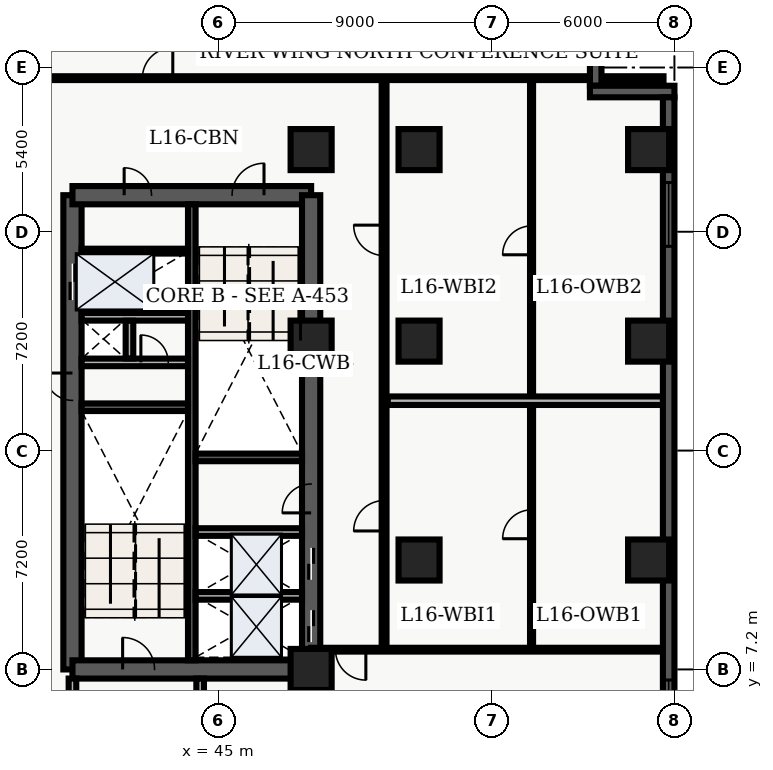
"""IFC4 building model, lengths in metres.
Left out: names, types, materials, properties, quantities, classifications, styles, units other than length and angle.
Written with IfcOpenShell. Run it as: python <this file> out.ifc"""

import sys

from ifc_helpers import new_model, entity, si_unit, converted_unit, direction, frame, origin_with_axes, origin_2d_with_axis, place, context, subcontext, project, spatial, polyline, rectangle, outline, extrude, element, fill, save


model = new_model("IFC4")
c1 = context("Model", 3, precision=1e-05, world=origin_with_axes(), true_north=direction((0.0, 1.0)))
c2 = subcontext(c1, "Body", "Model", "MODEL_VIEW")
j1 = project(units=[si_unit("LENGTHUNIT", "METRE"), converted_unit("PLANEANGLEUNIT", "DEGREE", entity("IfcPlaneAngleMeasure", 0.017), si_unit("PLANEANGLEUNIT", "RADIAN"), dimensions=[0, 0, 0, 0, 0, 0, 0])], contexts=[c1])
p1 = place(None, origin_with_axes())
s1 = spatial("IfcSite", under=j1, at=p1, CompositionType="ELEMENT")
p2 = place(p1, origin_with_axes())
s2 = spatial("IfcBuilding", under=s1, at=p2, CompositionType="ELEMENT")
p3 = place(p2, frame((0.0, 0.0, 67.8), z_axis=(0.0, 0.0, 1.0), x_axis=(1.0, 0.0, 0.0)))
s3 = spatial("IfcBuildingStorey", under=s2, at=p3, CompositionType="ELEMENT", Elevation=67.8)
p4 = place(p3, frame((40.2, 7.2, 0.0), z_axis=(0.0, 0.0, 1.0), x_axis=(0.0, 1.0, 0.0)))
e1 = element("IfcWall", 1, at=p4, inside=s3, PredefinedType="SHEAR", context=c2, shape_type="SweptSolid", body=[
    extrude(outline(polyline([(0.0, -0.3), (15.6, -0.3), (15.6, 0.3), (0.0, 0.3), (0.0, -0.3)])), origin_with_axes(), (0.0, 0.0, 1.0), 3.66),
])
p5 = place(p4, frame((12.75, 0.0, 0.0), z_axis=(0.0, 0.0, 1.0), x_axis=(1.0, 0.0, 0.0)))
e2 = element("IfcOpeningElement", 2, at=p5, cuts=e1, PredefinedType="OPENING", context=c2, shape_type="SweptSolid", body=[
    extrude(rectangle(XDim=1.2, YDim=0.62, at=origin_2d_with_axis()), origin_with_axes(), (0.0, 0.0, 1.0), 2.15),
])
p6 = place(p4, frame((9.3, 0.0, 0.0), z_axis=(0.0, 0.0, 1.0), x_axis=(1.0, 0.0, 0.0)))
e3 = element("IfcOpeningElement", 3, at=p6, cuts=e1, PredefinedType="OPENING", context=c2, shape_type="SweptSolid", body=[
    extrude(rectangle(XDim=0.9, YDim=0.62, at=origin_2d_with_axis()), origin_with_axes(), (0.0, 0.0, 1.0), 2.15),
])
p7 = place(p3, frame((40.2, 7.2, 0.0), z_axis=(0.0, 0.0, 1.0), x_axis=(1.0, 0.0, 0.0)))
e4 = element("IfcWall", 4, at=p7, inside=s3, PredefinedType="SHEAR", context=c2, shape_type="SweptSolid", body=[
    extrude(outline(polyline([(0.0, -0.3), (7.85, -0.3), (7.85, 0.3), (0.0, 0.3), (0.0, -0.3)])), origin_with_axes(), (0.0, 0.0, 1.0), 3.66),
])
p8 = place(p7, frame((2.175, 0.0, 0.0), z_axis=(0.0, 0.0, 1.0), x_axis=(1.0, 0.0, 0.0)))
e5 = element("IfcOpeningElement", 5, at=p8, cuts=e4, PredefinedType="OPENING", context=c2, shape_type="SweptSolid", body=[
    extrude(rectangle(XDim=1.05, YDim=0.62, at=origin_2d_with_axis()), origin_with_axes(), (0.0, 0.0, 1.0), 2.15),
])
p9 = place(p3, frame((40.2, 22.8, 0.0), z_axis=(0.0, 0.0, 1.0), x_axis=(1.0, 0.0, 0.0)))
e6 = element("IfcWall", 6, at=p9, inside=s3, PredefinedType="SHEAR", context=c2, shape_type="SweptSolid", body=[
    extrude(outline(polyline([(0.0, -0.3), (7.85, -0.3), (7.85, 0.3), (0.0, 0.3), (0.0, -0.3)])), origin_with_axes(), (0.0, 0.0, 1.0), 3.66),
])
p10 = place(p9, frame((5.775, 0.0, 0.0), z_axis=(0.0, 0.0, 1.0), x_axis=(1.0, 0.0, 0.0)))
e7 = element("IfcOpeningElement", 7, at=p10, cuts=e6, PredefinedType="OPENING", context=c2, shape_type="SweptSolid", body=[
    extrude(rectangle(XDim=1.05, YDim=0.62, at=origin_2d_with_axis()), origin_with_axes(), (0.0, 0.0, 1.0), 2.15),
])
p11 = place(p9, frame((2.15, 0.0, 0.0), z_axis=(0.0, 0.0, 1.0), x_axis=(1.0, 0.0, 0.0)))
e8 = element("IfcOpeningElement", 8, at=p11, cuts=e6, PredefinedType="OPENING", context=c2, shape_type="SweptSolid", body=[
    extrude(rectangle(XDim=0.9, YDim=0.62, at=origin_2d_with_axis()), origin_with_axes(), (0.0, 0.0, 1.0), 2.15),
])
p12 = place(p3, frame((48.05, 7.2, 0.0), z_axis=(0.0, 0.0, 1.0), x_axis=(0.0, 1.0, 0.0)))
e9 = element("IfcWall", 9, at=p12, inside=s3, PredefinedType="SHEAR", context=c2, shape_type="SweptSolid", body=[
    extrude(outline(polyline([(0.0, -0.3), (15.6, -0.3), (15.6, 0.3), (0.0, 0.3), (0.0, -0.3)])), origin_with_axes(), (0.0, 0.0, 1.0), 3.66),
])
p13 = place(p12, frame((1.425, 0.0, 0.0), z_axis=(0.0, 0.0, 1.0), x_axis=(1.0, 0.0, 0.0)))
e10 = element("IfcOpeningElement", 10, at=p13, cuts=e9, PredefinedType="OPENING", context=c2, shape_type="SweptSolid", body=[
    extrude(rectangle(XDim=1.05, YDim=0.62, at=origin_2d_with_axis()), origin_with_axes(), (0.0, 0.0, 1.0), 2.15),
])
p14 = place(p12, frame((3.475, 0.0, 0.0), z_axis=(0.0, 0.0, 1.0), x_axis=(1.0, 0.0, 0.0)))
e11 = element("IfcOpeningElement", 11, at=p14, cuts=e9, PredefinedType="OPENING", context=c2, shape_type="SweptSolid", body=[
    extrude(rectangle(XDim=1.05, YDim=0.62, at=origin_2d_with_axis()), origin_with_axes(), (0.0, 0.0, 1.0), 2.15),
])
p15 = place(p12, frame((5.625, 0.0, 0.0), z_axis=(0.0, 0.0, 1.0), x_axis=(1.0, 0.0, 0.0)))
e12 = element("IfcOpeningElement", 12, at=p15, cuts=e9, PredefinedType="OPENING", context=c2, shape_type="SweptSolid", body=[
    extrude(rectangle(XDim=0.95, YDim=0.62, at=origin_2d_with_axis()), origin_with_axes(), (0.0, 0.0, 1.0), 2.15),
])
p16 = place(p3, frame((44.125, 7.5, 0.0), z_axis=(0.0, 0.0, 1.0), x_axis=(0.0, 1.0, 0.0)))
e13 = element("IfcWall", 13, at=p16, inside=s3, PredefinedType="SHEAR", context=c2, shape_type="SweptSolid", body=[
    extrude(outline(polyline([(0.0, -0.125), (15.0, -0.125), (15.0, 0.125), (0.0, 0.125), (0.0, -0.125)])), origin_with_axes(), (0.0, 0.0, 1.0), 3.66),
])
for number, where, z_axis, x_axis in (
    (14, (40.5, 15.825, 0.0), (0.0, 0.0, 1.0), (1.0, 0.0, 0.0)),
    (15, (44.25, 14.175, 0.0), (0.0, 0.0, 1.0), (1.0, 0.0, 0.0)),
):
    element("IfcWall", number, at=place(p3, frame(where, z_axis=z_axis, x_axis=x_axis)), inside=s3, PredefinedType="SHEAR", context=c2, shape_type="SweptSolid", body=[
        extrude(outline(polyline([(0.0, -0.125), (3.5, -0.125), (3.5, 0.125), (0.0, 0.125), (0.0, -0.125)])), origin_with_axes(), (0.0, 0.0, 1.0), 3.66),
    ])
p17 = place(p3, frame((40.5, 17.3, 0.0), z_axis=(0.0, 0.0, 1.0), x_axis=(1.0, 0.0, 0.0)))
e16 = element("IfcWall", 16, at=p17, inside=s3, PredefinedType="SOLIDWALL", context=c2, shape_type="SweptSolid", body=[
    extrude(outline(polyline([(0.0, -0.125), (3.5, -0.125), (3.5, 0.125), (0.0, 0.125), (0.0, -0.125)])), origin_with_axes(), (0.0, 0.0, 1.0), 2.7),
])
p18 = place(p17, frame((2.4, 0.0, 0.0), z_axis=(0.0, 0.0, 1.0), x_axis=(1.0, 0.0, 0.0)))
e17 = element("IfcOpeningElement", 17, at=p18, cuts=e16, PredefinedType="OPENING", context=c2, shape_type="SweptSolid", body=[
    extrude(rectangle(XDim=0.9, YDim=0.27, at=origin_2d_with_axis()), origin_with_axes(), (0.0, 0.0, 1.0), 2.15),
])
p19 = place(p3, frame((40.5, 18.8, 0.0), z_axis=(0.0, 0.0, 1.0), x_axis=(1.0, 0.0, 0.0)))
e18 = element("IfcWall", 18, at=p19, inside=s3, PredefinedType="SOLIDWALL", context=c2, shape_type="SweptSolid", body=[
    extrude(outline(polyline([(0.0, -0.125), (3.5, -0.125), (3.5, 0.125), (0.0, 0.125), (0.0, -0.125)])), origin_with_axes(), (0.0, 0.0, 1.0), 2.7),
])
p20 = place(p3, frame((42.075, 17.43, 0.0), z_axis=(0.0, 0.0, 1.0), x_axis=(0.0, 1.0, 0.0)))
e19 = element("IfcWall", 19, at=p20, inside=s3, PredefinedType="SOLIDWALL", context=c2, shape_type="SweptSolid", body=[
    extrude(outline(polyline([(0.0, -0.125), (1.24, -0.125), (1.24, 0.125), (0.0, 0.125), (0.0, -0.125)])), origin_with_axes(), (0.0, 0.0, 1.0), 2.7),
])
p21 = place(p3, frame((40.2, 3.1, 0.0), z_axis=(0.0, 0.0, 1.0), x_axis=(0.0, 1.0, 0.0)))
e20 = element("IfcWall", 20, at=p21, inside=s3, PredefinedType="SOLIDWALL", context=c2, shape_type="SweptSolid", body=[
    extrude(outline(polyline([(0.0, -0.125), (3.8, -0.125), (3.8, 0.125), (0.0, 0.125), (0.0, -0.125)])), origin_with_axes(), (0.0, 0.0, 1.0), 2.7),
])
p22 = place(p21, frame((2.075, 0.0, 0.0), z_axis=(0.0, 0.0, 1.0), x_axis=(1.0, 0.0, 0.0)))
e21 = element("IfcOpeningElement", 21, at=p22, cuts=e20, PredefinedType="OPENING", context=c2, shape_type="SweptSolid", body=[
    extrude(rectangle(XDim=1.05, YDim=0.27, at=origin_2d_with_axis()), origin_with_axes(), (0.0, 0.0, 1.0), 2.15),
])
p23 = place(p3, frame((44.4, 3.1, 0.0), z_axis=(0.0, 0.0, 1.0), x_axis=(0.0, 1.0, 0.0)))
e22 = element("IfcWall", 22, at=p23, inside=s3, PredefinedType="SOLIDWALL", context=c2, shape_type="SweptSolid", body=[
    extrude(outline(polyline([(0.0, -0.125), (3.8, -0.125), (3.8, 0.125), (0.0, 0.125), (0.0, -0.125)])), origin_with_axes(), (0.0, 0.0, 1.0), 2.7),
])
for number, where, z_axis, x_axis in (
    (23, (48.05, 7.2, 0.0), (0.0, 0.0, 1.0), (1.0, 0.0, 0.0)),
    (24, (48.05, 18.0, 0.0), (0.0, 0.0, 1.0), (1.0, 0.0, 0.0)),
    (25, (48.05, 24.3, 0.0), (0.0, 0.0, 1.0), (1.0, 0.0, 0.0)),
    (26, (51.6, 10.8, 0.0), (0.0, 0.0, 1.0), (1.0, 0.0, 0.0)),
    (27, (51.6, 18.0, 0.0), (0.0, 0.0, 1.0), (1.0, 0.0, 0.0)),
    (28, (51.6, 24.3, 0.0), (0.0, 0.0, 1.0), (1.0, 0.0, 0.0)),
    (29, (59.15, 10.8, 0.0), (0.0, 0.0, 1.0), (1.0, 0.0, 0.0)),
    (30, (59.15, 18.0, 0.0), (0.0, 0.0, 1.0), (1.0, 0.0, 0.0)),
    (31, (59.15, 24.3, 0.0), (0.0, 0.0, 1.0), (1.0, 0.0, 0.0)),
):
    element("IfcColumn", number, at=place(p3, frame(where, z_axis=z_axis, x_axis=x_axis)), inside=s3, PredefinedType="COLUMN", context=c2, shape_type="SweptSolid", body=[
        extrude(rectangle(XDim=1.35, YDim=1.35, at=origin_2d_with_axis()), origin_with_axes(), (0.0, 0.0, 1.0), 3.9),
    ])
p24 = place(p3, frame((40.5, 20.96, 0.0), z_axis=(0.0, 0.0, 1.0), x_axis=(1.0, 0.0, 0.0)))
e32 = element("IfcWall", 32, at=p24, inside=s3, PredefinedType="PARTITIONING", context=c2, shape_type="SweptSolid", body=[
    extrude(outline(polyline([(0.0, -0.08), (3.5, -0.08), (3.5, 0.08), (0.0, 0.08), (0.0, -0.08)])), origin_with_axes(), (0.0, 0.0, 1.0), 2.7),
])
for number, where, z_axis, x_axis in (
    (33, (44.25, 9.62, 0.0), (0.0, 0.0, 1.0), (1.0, 0.0, 0.0)),
    (34, (44.25, 11.72, 0.0), (0.0, 0.0, 1.0), (1.0, 0.0, 0.0)),
):
    element("IfcWall", number, at=place(p3, frame(where, z_axis=z_axis, x_axis=x_axis)), inside=s3, PredefinedType="SOLIDWALL", context=c2, shape_type="SweptSolid", body=[
        extrude(outline(polyline([(0.0, -0.125), (3.5, -0.125), (3.5, 0.125), (0.0, 0.125), (0.0, -0.125)])), origin_with_axes(), (0.0, 0.0, 1.0), 2.7),
    ])
p25 = place(p3, frame((50.45, 7.85, 0.0), z_axis=(0.0, 0.0, 1.0), x_axis=(0.0, 1.0, 0.0)))
e35 = element("IfcWall", 35, at=p25, inside=s3, PredefinedType="PARTITIONING", context=c2, shape_type="SweptSolid", body=[
    extrude(outline(polyline([(0.0, -0.08), (18.8, -0.08), (18.8, 0.08), (0.0, 0.08), (0.0, -0.08)])), origin_with_axes(), (0.0, 0.0, 1.0), 2.7),
])
p26 = place(p25, frame((4.405, 0.0, 0.0), z_axis=(0.0, 0.0, 1.0), x_axis=(1.0, 0.0, 0.0)))
e36 = element("IfcOpeningElement", 36, at=p26, cuts=e35, PredefinedType="OPENING", context=c2, shape_type="SweptSolid", body=[
    extrude(rectangle(XDim=1.0, YDim=0.18, at=origin_2d_with_axis()), origin_with_axes(), (0.0, 0.0, 1.0), 2.15),
])
p27 = place(p25, frame((13.465, 0.0, 0.0), z_axis=(0.0, 0.0, 1.0), x_axis=(1.0, 0.0, 0.0)))
e37 = element("IfcOpeningElement", 37, at=p27, cuts=e35, PredefinedType="OPENING", context=c2, shape_type="SweptSolid", body=[
    extrude(rectangle(XDim=1.0, YDim=0.18, at=origin_2d_with_axis()), origin_with_axes(), (0.0, 0.0, 1.0), 2.15),
])
p28 = place(p3, frame((59.64, 7.85, 0.0), z_axis=(0.0, 0.0, 1.0), x_axis=(-1.0, 0.0, 0.0)))
e38 = element("IfcWall", 38, at=p28, inside=s3, PredefinedType="PARTITIONING", context=c2, shape_type="SweptSolid", body=[
    extrude(outline(polyline([(0.0, -0.062), (11.59, -0.062), (11.59, 0.062), (0.0, 0.062), (0.0, -0.062)])), origin_with_axes(), (0.0, 0.0, 1.0), 2.7),
])
p29 = place(p28, frame((10.29, 0.0, 0.0), z_axis=(0.0, 0.0, 1.0), x_axis=(1.0, 0.0, 0.0)))
e39 = element("IfcOpeningElement", 39, at=p29, cuts=e38, PredefinedType="OPENING", context=c2, shape_type="SweptSolid", body=[
    extrude(rectangle(XDim=1.0, YDim=0.145, at=origin_2d_with_axis()), origin_with_axes(), (0.0, 0.0, 1.0), 2.15),
])
p30 = place(p3, frame((38.76, 26.65, 0.0), z_axis=(0.0, 0.0, 1.0), x_axis=(1.0, 0.0, 0.0)))
e40 = element("IfcWall", 40, at=p30, inside=s3, PredefinedType="PARTITIONING", context=c2, shape_type="SweptSolid", body=[
    extrude(outline(polyline([(0.0, -0.062), (20.88, -0.062), (20.88, 0.062), (0.0, 0.062), (0.0, -0.062)])), origin_with_axes(), (0.0, 0.0, 1.0), 2.7),
])
p31 = place(p30, frame((4.24, 0.0, 0.0), z_axis=(0.0, 0.0, 1.0), x_axis=(1.0, 0.0, 0.0)))
e41 = element("IfcOpeningElement", 41, at=p31, cuts=e40, PredefinedType="OPENING", context=c2, shape_type="SweptSolid", body=[
    extrude(rectangle(XDim=1.0, YDim=0.145, at=origin_2d_with_axis()), origin_with_axes(), (0.0, 0.0, 1.0), 2.15),
])
p32 = place(p3, frame((55.3, 7.98, 0.0), z_axis=(0.0, 0.0, 1.0), x_axis=(0.0, 1.0, 0.0)))
e42 = element("IfcWall", 42, at=p32, inside=s3, PredefinedType="PARTITIONING", context=c2, shape_type="SweptSolid", body=[
    extrude(outline(polyline([(0.0, -0.05), (18.54, -0.05), (18.54, 0.05), (0.0, 0.05), (0.0, -0.05)])), origin_with_axes(), (0.0, 0.0, 1.0), 2.7),
])
p33 = place(p32, frame((3.995, 0.0, 0.0), z_axis=(0.0, 0.0, 1.0), x_axis=(1.0, 0.0, 0.0)))
e43 = element("IfcOpeningElement", 43, at=p33, cuts=e42, PredefinedType="OPENING", context=c2, shape_type="SweptSolid", body=[
    extrude(rectangle(XDim=0.95, YDim=0.12, at=origin_2d_with_axis()), origin_with_axes(), (0.0, 0.0, 1.0), 2.15),
])
p34 = place(p32, frame((13.335, 0.0, 0.0), z_axis=(0.0, 0.0, 1.0), x_axis=(1.0, 0.0, 0.0)))
e44 = element("IfcOpeningElement", 44, at=p34, cuts=e42, PredefinedType="OPENING", context=c2, shape_type="SweptSolid", body=[
    extrude(rectangle(XDim=0.95, YDim=0.12, at=origin_2d_with_axis()), origin_with_axes(), (0.0, 0.0, 1.0), 2.15),
])
p35 = place(p3, frame((50.57, 16.04, 0.0), z_axis=(0.0, 0.0, 1.0), x_axis=(1.0, 0.0, 0.0)))
e45 = element("IfcWall", 45, at=p35, inside=s3, PredefinedType="PARTITIONING", context=c2, shape_type="SweptSolid", body=[
    extrude(outline(polyline([(0.0, -0.14), (9.055, -0.14), (9.055, 0.14), (0.0, 0.14), (0.0, -0.14)])), origin_with_axes(), (0.0, 0.0, 1.0), 2.7),
])
p36 = place(p3, frame((57.41, 28.42, 0.0), z_axis=(0.0, 0.0, 1.0), x_axis=(0.0, -1.0, 0.0)))
e46 = element("IfcWall", 46, at=p36, inside=s3, PredefinedType="SOLIDWALL", context=c2, shape_type="SweptSolid", body=[
    extrude(outline(polyline([(0.0, -0.19), (2.02, -0.19), (2.02, 0.19), (0.0, 0.19), (0.0, -0.19)])), origin_with_axes(), (0.0, 0.0, 1.0), 3.66),
])
p37 = place(p3, frame((57.22, 26.21, 0.0), z_axis=(0.0, 0.0, 1.0), x_axis=(1.0, 0.0, 0.0)))
e47 = element("IfcWall", 47, at=p37, inside=s3, PredefinedType="SOLIDWALL", context=c2, shape_type="SweptSolid", body=[
    extrude(outline(polyline([(0.0, -0.19), (2.78, -0.19), (2.78, 0.19), (0.0, 0.19), (0.0, -0.19)])), origin_with_axes(), (0.0, 0.0, 1.0), 3.66),
])
p38 = place(p3, frame((59.81, 26.02, 0.0), z_axis=(0.0, 0.0, 1.0), x_axis=(0.0, -1.0, 0.0)))
e48 = element("IfcWall", 48, at=p38, inside=s3, PredefinedType="SOLIDWALL", context=c2, shape_type="SweptSolid", body=[
    extrude(outline(polyline([(0.0, -0.19), (23.62, -0.19), (23.62, 0.19), (0.0, 0.19), (0.0, -0.19)])), origin_with_axes(), (0.0, 0.0, 1.0), 3.66),
])
p39 = place(p38, frame((3.853, 0.0, 0.45), z_axis=(0.0, 0.0, 1.0), x_axis=(1.0, 0.0, 0.0)))
e49 = element("IfcOpeningElement", 49, at=p39, cuts=e48, PredefinedType="OPENING", context=c2, shape_type="SweptSolid", body=[
    extrude(rectangle(XDim=2.1, YDim=0.4, at=origin_2d_with_axis()), origin_with_axes(), (0.0, 0.0, 1.0), 2.2),
])
p40 = place(p38, frame((20.218, 0.0, 0.45), z_axis=(0.0, 0.0, 1.0), x_axis=(1.0, 0.0, 0.0)))
e50 = element("IfcOpeningElement", 50, at=p40, cuts=e48, PredefinedType="OPENING", context=c2, shape_type="SweptSolid", body=[
    extrude(rectangle(XDim=2.1, YDim=0.4, at=origin_2d_with_axis()), origin_with_axes(), (0.0, 0.0, 1.0), 2.2),
])
p41 = place(p12, frame((1.425, 0.0, 0.0), z_axis=(0.0, 0.0, 1.0), x_axis=(1.0, 0.0, 0.0)))
e51 = element("IfcDoor", 51, at=p41, inside=s3, OperationType="SLIDING_TO_LEFT", PredefinedType="DOOR", context=c2, shape_type="SweptSolid", body=[
    extrude(rectangle(XDim=1.05, YDim=0.09, at=origin_2d_with_axis()), origin_with_axes(), (0.0, 0.0, 1.0), 2.15),
])
fill(e10, e51)
p42 = place(p12, frame((3.475, 0.0, 0.0), z_axis=(0.0, 0.0, 1.0), x_axis=(1.0, 0.0, 0.0)))
e52 = element("IfcDoor", 52, at=p42, inside=s3, OperationType="SLIDING_TO_RIGHT", PredefinedType="DOOR", context=c2, shape_type="SweptSolid", body=[
    extrude(rectangle(XDim=1.05, YDim=0.09, at=origin_2d_with_axis()), origin_with_axes(), (0.0, 0.0, 1.0), 2.15),
])
fill(e11, e52)
p43 = place(p4, frame((12.75, 0.0, 0.0), z_axis=(0.0, 0.0, 1.0), x_axis=(1.0, 0.0, 0.0)))
e53 = element("IfcDoor", 53, at=p43, inside=s3, OperationType="DOUBLE_DOOR_SLIDING", PredefinedType="DOOR", context=c2, shape_type="SweptSolid", body=[
    extrude(rectangle(XDim=1.2, YDim=0.09, at=origin_2d_with_axis()), origin_with_axes(), (0.0, 0.0, 1.0), 2.15),
])
fill(e2, e53)
p44 = place(p4, frame((9.3, 0.0, 0.0), z_axis=(0.0, 0.0, 1.0), x_axis=(1.0, 0.0, 0.0)))
e54 = element("IfcDoor", 54, at=p44, inside=s3, OperationType="SINGLE_SWING_RIGHT", PredefinedType="DOOR", context=c2, shape_type="SweptSolid", body=[
    extrude(rectangle(XDim=0.9, YDim=0.09, at=origin_2d_with_axis()), origin_with_axes(), (0.0, 0.0, 1.0), 2.15),
])
fill(e3, e54)
p45 = place(p17, frame((2.4, 0.0, 0.0), z_axis=(0.0, 0.0, 1.0), x_axis=(1.0, 0.0, 0.0)))
e55 = element("IfcDoor", 55, at=p45, inside=s3, OperationType="SINGLE_SWING_LEFT", PredefinedType="DOOR", context=c2, shape_type="SweptSolid", body=[
    extrude(rectangle(XDim=0.9, YDim=0.09, at=origin_2d_with_axis()), origin_with_axes(), (0.0, 0.0, 1.0), 2.15),
])
fill(e17, e55)
p46 = place(p7, frame((2.175, 0.0, 0.0), z_axis=(0.0, 0.0, 1.0), x_axis=(1.0, 0.0, 0.0)))
e56 = element("IfcDoor", 56, at=p46, inside=s3, OperationType="SINGLE_SWING_LEFT", PredefinedType="DOOR", context=c2, shape_type="SweptSolid", body=[
    extrude(rectangle(XDim=1.05, YDim=0.09, at=origin_2d_with_axis()), origin_with_axes(), (0.0, 0.0, 1.0), 2.15),
])
fill(e5, e56)
p47 = place(p9, frame((5.775, 0.0, 0.0), z_axis=(0.0, 0.0, 1.0), x_axis=(1.0, 0.0, 0.0)))
e57 = element("IfcDoor", 57, at=p47, inside=s3, OperationType="SINGLE_SWING_RIGHT", PredefinedType="DOOR", context=c2, shape_type="SweptSolid", body=[
    extrude(rectangle(XDim=1.05, YDim=0.09, at=origin_2d_with_axis()), origin_with_axes(), (0.0, 0.0, 1.0), 2.15),
])
fill(e7, e57)
p48 = place(p9, frame((2.15, 0.0, 0.0), z_axis=(0.0, 0.0, 1.0), x_axis=(1.0, 0.0, 0.0)))
e58 = element("IfcDoor", 58, at=p48, inside=s3, OperationType="SINGLE_SWING_LEFT", PredefinedType="DOOR", context=c2, shape_type="SweptSolid", body=[
    extrude(rectangle(XDim=0.9, YDim=0.09, at=origin_2d_with_axis()), origin_with_axes(), (0.0, 0.0, 1.0), 2.15),
])
fill(e8, e58)
p49 = place(p12, frame((5.625, 0.0, 0.0), z_axis=(0.0, 0.0, 1.0), x_axis=(1.0, 0.0, 0.0)))
e59 = element("IfcDoor", 59, at=p49, inside=s3, OperationType="SINGLE_SWING_LEFT", PredefinedType="DOOR", context=c2, shape_type="SweptSolid", body=[
    extrude(rectangle(XDim=0.95, YDim=0.09, at=origin_2d_with_axis()), origin_with_axes(), (0.0, 0.0, 1.0), 2.15),
])
fill(e12, e59)
p50 = place(p28, frame((10.29, 0.0, 0.0), z_axis=(0.0, 0.0, 1.0), x_axis=(1.0, 0.0, 0.0)))
e60 = element("IfcDoor", 60, at=p50, inside=s3, OperationType="SINGLE_SWING_LEFT", PredefinedType="DOOR", context=c2, shape_type="SweptSolid", body=[
    extrude(rectangle(XDim=1.0, YDim=0.075, at=origin_2d_with_axis()), origin_with_axes(), (0.0, 0.0, 1.0), 2.15),
])
fill(e39, e60)
p51 = place(p30, frame((4.24, 0.0, 0.0), z_axis=(0.0, 0.0, 1.0), x_axis=(1.0, 0.0, 0.0)))
e61 = element("IfcDoor", 61, at=p51, inside=s3, OperationType="SINGLE_SWING_RIGHT", PredefinedType="DOOR", context=c2, shape_type="SweptSolid", body=[
    extrude(rectangle(XDim=1.0, YDim=0.075, at=origin_2d_with_axis()), origin_with_axes(), (0.0, 0.0, 1.0), 2.15),
])
fill(e41, e61)
p52 = place(p32, frame((3.995, 0.0, 0.0), z_axis=(0.0, 0.0, 1.0), x_axis=(1.0, 0.0, 0.0)))
e62 = element("IfcDoor", 62, at=p52, inside=s3, OperationType="SINGLE_SWING_LEFT", PredefinedType="DOOR", context=c2, shape_type="SweptSolid", body=[
    extrude(rectangle(XDim=0.95, YDim=0.06, at=origin_2d_with_axis()), origin_with_axes(), (0.0, 0.0, 1.0), 2.15),
])
fill(e43, e62)
p53 = place(p25, frame((4.405, 0.0, 0.0), z_axis=(0.0, 0.0, 1.0), x_axis=(1.0, 0.0, 0.0)))
e63 = element("IfcDoor", 63, at=p53, inside=s3, OperationType="SINGLE_SWING_LEFT", PredefinedType="DOOR", context=c2, shape_type="SweptSolid", body=[
    extrude(rectangle(XDim=1.0, YDim=0.09, at=origin_2d_with_axis()), origin_with_axes(), (0.0, 0.0, 1.0), 2.15),
])
fill(e36, e63)
p54 = place(p32, frame((13.335, 0.0, 0.0), z_axis=(0.0, 0.0, 1.0), x_axis=(1.0, 0.0, 0.0)))
e64 = element("IfcDoor", 64, at=p54, inside=s3, OperationType="SINGLE_SWING_LEFT", PredefinedType="DOOR", context=c2, shape_type="SweptSolid", body=[
    extrude(rectangle(XDim=0.95, YDim=0.06, at=origin_2d_with_axis()), origin_with_axes(), (0.0, 0.0, 1.0), 2.15),
])
fill(e44, e64)
p55 = place(p25, frame((13.465, 0.0, 0.0), z_axis=(0.0, 0.0, 1.0), x_axis=(1.0, 0.0, 0.0)))
e65 = element("IfcDoor", 65, at=p55, inside=s3, OperationType="SINGLE_SWING_RIGHT", PredefinedType="DOOR", context=c2, shape_type="SweptSolid", body=[
    extrude(rectangle(XDim=1.0, YDim=0.09, at=origin_2d_with_axis()), origin_with_axes(), (0.0, 0.0, 1.0), 2.15),
])
fill(e37, e65)
p56 = place(p38, frame((3.853, 0.0, 0.45), z_axis=(0.0, 0.0, 1.0), x_axis=(1.0, 0.0, 0.0)))
e66 = element("IfcWindow", 66, at=p56, inside=s3, PredefinedType="WINDOW", context=c2, shape_type="SweptSolid", body=[
    extrude(rectangle(XDim=2.1, YDim=0.09, at=origin_2d_with_axis()), origin_with_axes(), (0.0, 0.0, 1.0), 2.2),
])
fill(e49, e66)
p57 = place(p38, frame((20.218, 0.0, 0.45), z_axis=(0.0, 0.0, 1.0), x_axis=(1.0, 0.0, 0.0)))
e67 = element("IfcWindow", 67, at=p57, inside=s3, PredefinedType="WINDOW", context=c2, shape_type="SweptSolid", body=[
    extrude(rectangle(XDim=2.1, YDim=0.09, at=origin_2d_with_axis()), origin_with_axes(), (0.0, 0.0, 1.0), 2.2),
])
fill(e50, e67)
save(model, sys.argv[1])
